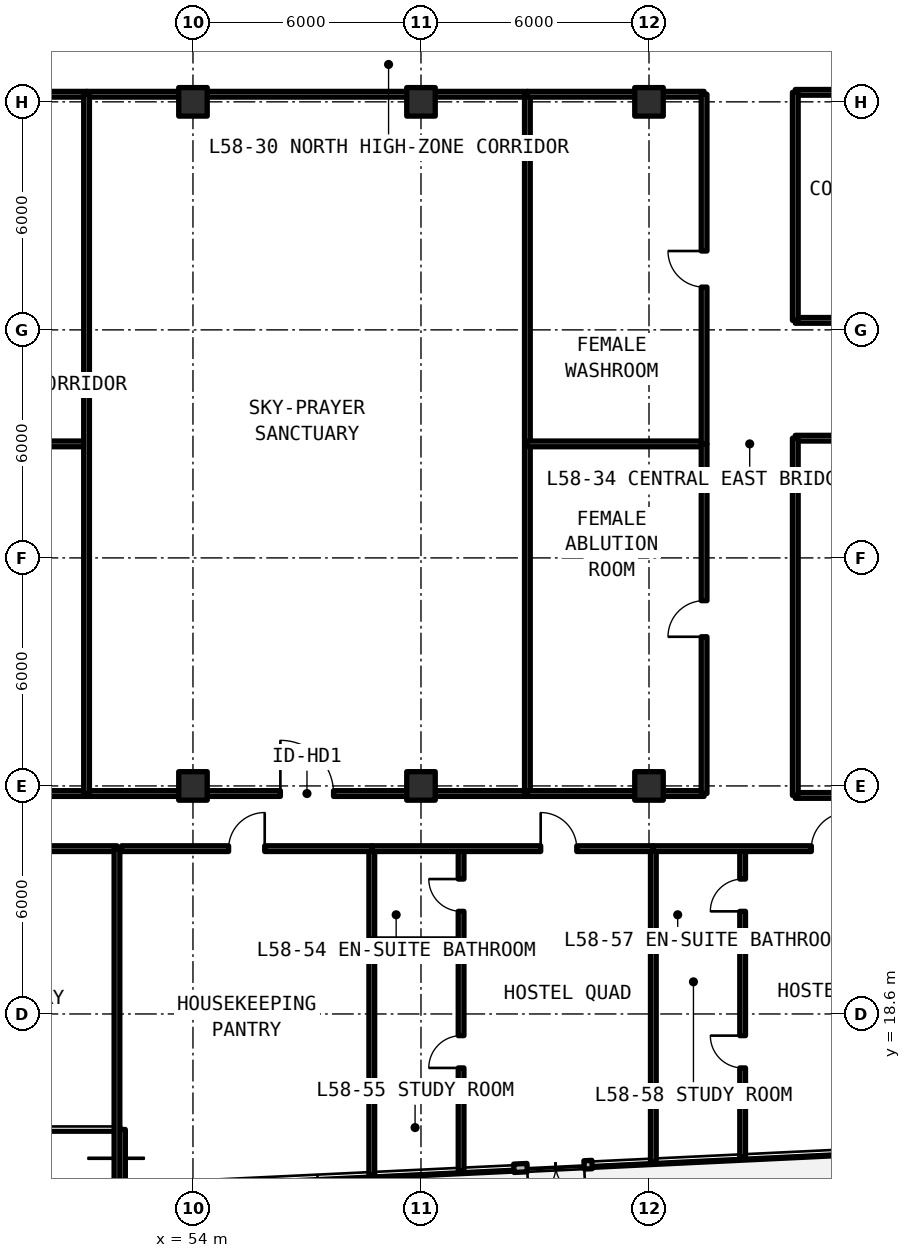
"""IFC4 building model, lengths in metres.
Left out: names, types, materials, properties, quantities, classifications, styles, units other than length and angle.
Written with IfcOpenShell. Run it as: python <this file> out.ifc"""

import sys

from ifc_helpers import new_model, si_unit, direction, frame, frame_2d, origin, origin_2d, place, context, subcontext, project, spatial, rectangle, extrude, element, fill, save


model = new_model("IFC4")
c1 = context("Model", 3, precision=1e-05, world=origin(), true_north=direction((0.0, 1.0)))
c2 = subcontext(c1, "Body", "Model", "MODEL_VIEW")
j1 = project(units=[si_unit("LENGTHUNIT", "METRE"), si_unit("PLANEANGLEUNIT", "RADIAN")], contexts=[c1])
p1 = place(None, origin())
s1 = spatial("IfcSite", under=j1, at=p1, CompositionType="ELEMENT")
p2 = place(p1, origin())
s2 = spatial("IfcBuilding", under=s1, at=p2, CompositionType="ELEMENT")
p3 = place(p2, frame((0.0, 0.0, 208.23)))
s3 = spatial("IfcBuildingStorey", under=s2, at=p3, CompositionType="ELEMENT", Elevation=208.23)
for number, where, z_axis, x_axis in (
    (1, (54.0, 24.6, 0.0), (0.0, 0.0, 1.0), (1.0, 0.0, 0.0)),
    (2, (54.0, 42.6, 0.0), (0.0, 0.0, 1.0), (1.0, 0.0, 0.0)),
    (3, (60.0, 24.6, 0.0), (0.0, 0.0, 1.0), (1.0, 0.0, 0.0)),
    (4, (60.0, 42.6, 0.0), (0.0, 0.0, 1.0), (1.0, 0.0, 0.0)),
    (5, (66.0, 24.6, 0.0), (0.0, 0.0, 1.0), (1.0, 0.0, 0.0)),
    (6, (66.0, 42.6, 0.0), (0.0, 0.0, 1.0), (1.0, 0.0, 0.0)),
):
    element("IfcColumn", number, at=place(p3, frame(where, z_axis=z_axis, x_axis=x_axis)), inside=s3, PredefinedType="COLUMN", context=c2, shape_type="SweptSolid", body=[
        extrude(rectangle(XDim=0.75, YDim=0.75, at=origin_2d()), origin(), (0.0, 0.0, 1.0), 3.63),
    ])
p4 = place(p3, frame((52.11, 15.56, 0.0), z_axis=(0.0, 0.0, 1.0), x_axis=(0.0, -1.0, 0.0)))
e7 = element("IfcWall", 7, at=p4, inside=s3, PredefinedType="SOLIDWALL", context=c2, shape_type="SweptSolid", body=[
    extrude(rectangle(XDim=1.515, YDim=0.22, at=frame_2d((0.757, 0.0))), origin(), (0.0, 0.0, 1.0), 3.41),
])
p5 = place(p3, frame((62.445, 14.54, 0.0), z_axis=(0.0, 0.0, 1.0), x_axis=(0.998858733476, 0.047762229425, 0.0)))
e8 = element("IfcWall", 8, at=p5, inside=s3, PredefinedType="SOLIDWALL", context=c2, shape_type="SweptSolid", body=[
    extrude(rectangle(XDim=2.06, YDim=0.22, at=frame_2d((1.03, 0.0))), origin(), (0.0, 0.0, 1.0), 3.41),
])
p6 = place(p5, frame((0.35, 0.0, 0.0)))
e9 = element("IfcOpeningElement", 9, at=p6, cuts=e8, PredefinedType="OPENING", context=c2, shape_type="SweptSolid", body=[
    extrude(rectangle(XDim=1.5, YDim=2.2, at=frame_2d((0.75, 1.1))), frame((0.0, 0.12, 0.0), z_axis=(0.0, -1.0, 0.0), x_axis=(1.0, 0.0, 0.0)), (0.0, 0.0, 1.0), 0.24),
])
p7 = place(p3, frame((69.85, 24.35, 0.0), z_axis=(0.0, 0.0, 1.0), x_axis=(1.0, 0.0, 0.0)))
e10 = element("IfcWall", 10, at=p7, inside=s3, PredefinedType="SOLIDWALL", context=c2, shape_type="SweptSolid", body=[
    extrude(rectangle(XDim=7.905, YDim=0.15, at=frame_2d((3.952, 0.0))), origin(), (0.0, 0.0, 1.0), 2.63),
])
p8 = place(p3, frame((69.85, 33.75, 0.0), z_axis=(0.0, 0.0, 1.0), x_axis=(1.0, 0.0, 0.0)))
e11 = element("IfcWall", 11, at=p8, inside=s3, PredefinedType="SOLIDWALL", context=c2, shape_type="SweptSolid", body=[
    extrude(rectangle(XDim=7.905, YDim=0.15, at=frame_2d((3.952, 0.0))), origin(), (0.0, 0.0, 1.0), 2.63),
])
p9 = place(p8, frame((3.478, 0.0, 0.0)))
e12 = element("IfcOpeningElement", 12, at=p9, cuts=e11, PredefinedType="OPENING", context=c2, shape_type="SweptSolid", body=[
    extrude(rectangle(XDim=0.95, YDim=2.15, at=frame_2d((0.475, 1.075))), frame((0.0, 0.085, 0.0), z_axis=(0.0, -1.0, 0.0), x_axis=(1.0, 0.0, 0.0)), (0.0, 0.0, 1.0), 0.17),
])
p10 = place(p3, frame((69.85, 24.35, 0.0), z_axis=(0.0, 0.0, 1.0), x_axis=(0.0, 1.0, 0.0)))
e13 = element("IfcWall", 13, at=p10, inside=s3, PredefinedType="SOLIDWALL", context=c2, shape_type="SweptSolid", body=[
    extrude(rectangle(XDim=9.4, YDim=0.15, at=frame_2d((4.7, 0.0))), origin(), (0.0, 0.0, 1.0), 2.63),
])
p11 = place(p3, frame((69.85, 36.85, 0.0), z_axis=(0.0, 0.0, 1.0), x_axis=(1.0, 0.0, 0.0)))
e14 = element("IfcWall", 14, at=p11, inside=s3, PredefinedType="SOLIDWALL", context=c2, shape_type="SweptSolid", body=[
    extrude(rectangle(XDim=7.905, YDim=0.15, at=frame_2d((3.952, 0.0))), origin(), (0.0, 0.0, 1.0), 2.63),
])
p12 = place(p11, frame((3.478, 0.0, 0.0)))
e15 = element("IfcOpeningElement", 15, at=p12, cuts=e14, PredefinedType="OPENING", context=c2, shape_type="SweptSolid", body=[
    extrude(rectangle(XDim=0.95, YDim=2.15, at=frame_2d((0.475, 1.075))), frame((0.0, 0.085, 0.0), z_axis=(0.0, -1.0, 0.0), x_axis=(1.0, 0.0, 0.0)), (0.0, 0.0, 1.0), 0.17),
])
p13 = place(p3, frame((69.85, 42.85, 0.0), z_axis=(0.0, 0.0, 1.0), x_axis=(1.0, 0.0, 0.0)))
e16 = element("IfcWall", 16, at=p13, inside=s3, PredefinedType="SOLIDWALL", context=c2, shape_type="SweptSolid", body=[
    extrude(rectangle(XDim=7.905, YDim=0.15, at=frame_2d((3.952, 0.0))), origin(), (0.0, 0.0, 1.0), 2.63),
])
p14 = place(p3, frame((69.85, 36.85, 0.0), z_axis=(0.0, 0.0, 1.0), x_axis=(0.0, 1.0, 0.0)))
e17 = element("IfcWall", 17, at=p14, inside=s3, PredefinedType="SOLIDWALL", context=c2, shape_type="SweptSolid", body=[
    extrude(rectangle(XDim=6.0, YDim=0.15, at=frame_2d((3.0, 0.0))), origin(), (0.0, 0.0, 1.0), 2.63),
])
for number, where, z_axis, x_axis in (
    (18, (46.55, 24.4, 0.0), (0.0, 0.0, 1.0), (1.0, 0.0, 0.0)),
    (19, (46.55, 33.6, 0.0), (0.0, 0.0, 1.0), (1.0, 0.0, 0.0)),
    (20, (46.55, 42.8, 0.0), (0.0, 0.0, 1.0), (1.0, 0.0, 0.0)),
):
    element("IfcWall", number, at=place(p3, frame(where, z_axis=z_axis, x_axis=x_axis)), inside=s3, PredefinedType="SOLIDWALL", context=c2, shape_type="SweptSolid", body=[
        extrude(rectangle(XDim=4.65, YDim=0.15, at=frame_2d((2.325, 0.0))), origin(), (0.0, 0.0, 1.0), 2.63),
    ])
p15 = place(p3, frame((51.2, 24.4, 0.0), z_axis=(0.0, 0.0, 1.0), x_axis=(1.0, 0.0, 0.0)))
e21 = element("IfcWall", 21, at=p15, inside=s3, PredefinedType="SOLIDWALL", context=c2, shape_type="SweptSolid", body=[
    extrude(rectangle(XDim=11.6, YDim=0.15, at=frame_2d((5.8, 0.0))), origin(), (0.0, 0.0, 1.0), 2.63),
])
p16 = place(p15, frame((5.1, 0.0, 0.0)))
e22 = element("IfcOpeningElement", 22, at=p16, cuts=e21, PredefinedType="OPENING", context=c2, shape_type="SweptSolid", body=[
    extrude(rectangle(XDim=1.4, YDim=2.15, at=frame_2d((0.7, 1.075))), frame((0.0, 0.085, 0.0), z_axis=(0.0, -1.0, 0.0), x_axis=(1.0, 0.0, 0.0)), (0.0, 0.0, 1.0), 0.17),
])
p17 = place(p3, frame((51.2, 42.8, 0.0), z_axis=(0.0, 0.0, 1.0), x_axis=(1.0, 0.0, 0.0)))
e23 = element("IfcWall", 23, at=p17, inside=s3, PredefinedType="SOLIDWALL", context=c2, shape_type="SweptSolid", body=[
    extrude(rectangle(XDim=11.6, YDim=0.15, at=frame_2d((5.8, 0.0))), origin(), (0.0, 0.0, 1.0), 2.63),
])
for number, where, z_axis, x_axis in (
    (24, (51.2, 24.4, 0.0), (0.0, 0.0, 1.0), (0.0, 1.0, 0.0)),
    (25, (62.8, 24.4, 0.0), (0.0, 0.0, 1.0), (0.0, 1.0, 0.0)),
):
    element("IfcWall", number, at=place(p3, frame(where, z_axis=z_axis, x_axis=x_axis)), inside=s3, PredefinedType="SOLIDWALL", context=c2, shape_type="SweptSolid", body=[
        extrude(rectangle(XDim=18.4, YDim=0.15, at=frame_2d((9.2, 0.0))), origin(), (0.0, 0.0, 1.0), 2.63),
    ])
for number, where, z_axis, x_axis in (
    (26, (62.8, 24.4, 0.0), (0.0, 0.0, 1.0), (1.0, 0.0, 0.0)),
    (27, (62.8, 33.6, 0.0), (0.0, 0.0, 1.0), (1.0, 0.0, 0.0)),
):
    element("IfcWall", number, at=place(p3, frame(where, z_axis=z_axis, x_axis=x_axis)), inside=s3, PredefinedType="SOLIDWALL", context=c2, shape_type="SweptSolid", body=[
        extrude(rectangle(XDim=4.65, YDim=0.15, at=frame_2d((2.325, 0.0))), origin(), (0.0, 0.0, 1.0), 2.63),
    ])
p18 = place(p3, frame((67.45, 24.4, 0.0), z_axis=(0.0, 0.0, 1.0), x_axis=(0.0, 1.0, 0.0)))
e28 = element("IfcWall", 28, at=p18, inside=s3, PredefinedType="SOLIDWALL", context=c2, shape_type="SweptSolid", body=[
    extrude(rectangle(XDim=9.2, YDim=0.15, at=frame_2d((4.6, 0.0))), origin(), (0.0, 0.0, 1.0), 2.63),
])
p19 = place(p18, frame((4.125, 0.0, 0.0)))
e29 = element("IfcOpeningElement", 29, at=p19, cuts=e28, PredefinedType="OPENING", context=c2, shape_type="SweptSolid", body=[
    extrude(rectangle(XDim=0.95, YDim=2.15, at=frame_2d((0.475, 1.075))), frame((0.0, 0.085, 0.0), z_axis=(0.0, -1.0, 0.0), x_axis=(1.0, 0.0, 0.0)), (0.0, 0.0, 1.0), 0.17),
])
p20 = place(p3, frame((62.8, 42.8, 0.0), z_axis=(0.0, 0.0, 1.0), x_axis=(1.0, 0.0, 0.0)))
e30 = element("IfcWall", 30, at=p20, inside=s3, PredefinedType="SOLIDWALL", context=c2, shape_type="SweptSolid", body=[
    extrude(rectangle(XDim=4.65, YDim=0.15, at=frame_2d((2.325, 0.0))), origin(), (0.0, 0.0, 1.0), 2.63),
])
p21 = place(p3, frame((67.45, 33.6, 0.0), z_axis=(0.0, 0.0, 1.0), x_axis=(0.0, 1.0, 0.0)))
e31 = element("IfcWall", 31, at=p21, inside=s3, PredefinedType="SOLIDWALL", context=c2, shape_type="SweptSolid", body=[
    extrude(rectangle(XDim=9.2, YDim=0.15, at=frame_2d((4.6, 0.0))), origin(), (0.0, 0.0, 1.0), 2.63),
])
p22 = place(p21, frame((4.125, 0.0, 0.0)))
e32 = element("IfcOpeningElement", 32, at=p22, cuts=e31, PredefinedType="OPENING", context=c2, shape_type="SweptSolid", body=[
    extrude(rectangle(XDim=0.95, YDim=2.15, at=frame_2d((0.475, 1.075))), frame((0.0, 0.085, 0.0), z_axis=(0.0, -1.0, 0.0), x_axis=(1.0, 0.0, 0.0)), (0.0, 0.0, 1.0), 0.17),
])
p23 = place(p3, frame((43.6, 22.95, 0.0), z_axis=(0.0, 0.0, 1.0), x_axis=(1.0, 0.0, 0.0)))
e33 = element("IfcWall", 33, at=p23, inside=s3, PredefinedType="SOLIDWALL", context=c2, shape_type="SweptSolid", body=[
    extrude(rectangle(XDim=8.4, YDim=0.15, at=frame_2d((4.2, 0.0))), origin(), (0.0, 0.0, 1.0), 2.63),
])
p24 = place(p23, frame((2.3, 0.0, 0.0)))
e34 = element("IfcOpeningElement", 34, at=p24, cuts=e33, PredefinedType="OPENING", context=c2, shape_type="SweptSolid", body=[
    extrude(rectangle(XDim=1.1, YDim=2.15, at=frame_2d((0.55, 1.075))), frame((0.0, 0.085, 0.0), z_axis=(0.0, -1.0, 0.0), x_axis=(1.0, 0.0, 0.0)), (0.0, 0.0, 1.0), 0.17),
])
p25 = place(p3, frame((52.0, 14.046, 0.0), z_axis=(0.0, 0.0, 1.0), x_axis=(0.0, 1.0, 0.0)))
e35 = element("IfcWall", 35, at=p25, inside=s3, PredefinedType="SOLIDWALL", context=c2, shape_type="SweptSolid", body=[
    extrude(rectangle(XDim=8.904, YDim=0.15, at=frame_2d((4.452, 0.0))), origin(), (0.0, 0.0, 1.0), 2.63),
])
p26 = place(p3, frame((58.706, 14.361, 0.0), z_axis=(0.0, 0.0, 1.0), x_axis=(0.0, 1.0, 0.0)))
e36 = element("IfcWall", 36, at=p26, inside=s3, PredefinedType="SOLIDWALL", context=c2, shape_type="SweptSolid", body=[
    extrude(rectangle(XDim=8.589, YDim=0.15, at=frame_2d((4.294, 0.0))), origin(), (0.0, 0.0, 1.0), 2.63),
])
p27 = place(p3, frame((52.12, 22.95, 0.0), z_axis=(0.0, 0.0, 1.0), x_axis=(1.0, 0.0, 0.0)))
e37 = element("IfcWall", 37, at=p27, inside=s3, PredefinedType="SOLIDWALL", context=c2, shape_type="SweptSolid", body=[
    extrude(rectangle(XDim=6.585, YDim=0.15, at=frame_2d((3.293, 0.0))), origin(), (0.0, 0.0, 1.0), 2.63),
])
p28 = place(p27, frame((2.818, 0.0, 0.0)))
e38 = element("IfcOpeningElement", 38, at=p28, cuts=e37, PredefinedType="OPENING", context=c2, shape_type="SweptSolid", body=[
    extrude(rectangle(XDim=0.95, YDim=2.15, at=frame_2d((0.475, 1.075))), frame((0.0, 0.085, 0.0), z_axis=(0.0, -1.0, 0.0), x_axis=(1.0, 0.0, 0.0)), (0.0, 0.0, 1.0), 0.17),
])
p29 = place(p3, frame((66.114, 14.716, 0.0), z_axis=(0.0, 0.0, 1.0), x_axis=(0.0, 1.0, 0.0)))
e39 = element("IfcWall", 39, at=p29, inside=s3, PredefinedType="SOLIDWALL", context=c2, shape_type="SweptSolid", body=[
    extrude(rectangle(XDim=8.234, YDim=0.15, at=frame_2d((4.117, 0.0))), origin(), (0.0, 0.0, 1.0), 2.63),
])
p30 = place(p3, frame((58.706, 20.5, 0.0), z_axis=(0.0, 0.0, 1.0), x_axis=(1.0, 0.0, 0.0)))
e40 = element("IfcWall", 40, at=p30, inside=s3, PredefinedType="PARTITIONING", context=c2, shape_type="SweptSolid", body=[
    extrude(rectangle(XDim=2.35, YDim=0.15, at=frame_2d((1.175, 0.0))), origin(), (0.0, 0.0, 1.0), 2.63),
])
p31 = place(p3, frame((61.055, 14.473, 0.0), z_axis=(0.0, 0.0, 1.0), x_axis=(0.0, 1.0, 0.0)))
e41 = element("IfcWall", 41, at=p31, inside=s3, PredefinedType="PARTITIONING", context=c2, shape_type="SweptSolid", body=[
    extrude(rectangle(XDim=8.477, YDim=0.15, at=frame_2d((4.238, 0.0))), origin(), (0.0, 0.0, 1.0), 2.63),
])
p32 = place(p31, frame((2.707, 0.0, 0.0)))
e42 = element("IfcOpeningElement", 42, at=p32, cuts=e41, PredefinedType="OPENING", context=c2, shape_type="SweptSolid", body=[
    extrude(rectangle(XDim=0.85, YDim=2.1, at=frame_2d((0.425, 1.05))), frame((0.0, 0.085, 0.0), z_axis=(0.0, -1.0, 0.0), x_axis=(1.0, 0.0, 0.0)), (0.0, 0.0, 1.0), 0.17),
])
p33 = place(p31, frame((6.827, 0.0, 0.0)))
e43 = element("IfcOpeningElement", 43, at=p33, cuts=e41, PredefinedType="OPENING", context=c2, shape_type="SweptSolid", body=[
    extrude(rectangle(XDim=0.85, YDim=2.1, at=frame_2d((0.425, 1.05))), frame((0.0, 0.085, 0.0), z_axis=(0.0, -1.0, 0.0), x_axis=(1.0, 0.0, 0.0)), (0.0, 0.0, 1.0), 0.17),
])
p34 = place(p3, frame((58.706, 22.95, 0.0), z_axis=(0.0, 0.0, 1.0), x_axis=(1.0, 0.0, 0.0)))
e44 = element("IfcWall", 44, at=p34, inside=s3, PredefinedType="SOLIDWALL", context=c2, shape_type="SweptSolid", body=[
    extrude(rectangle(XDim=7.409, YDim=0.15, at=frame_2d((3.704, 0.0))), origin(), (0.0, 0.0, 1.0), 2.63),
])
p35 = place(p34, frame((4.444, 0.0, 0.0)))
e45 = element("IfcOpeningElement", 45, at=p35, cuts=e44, PredefinedType="OPENING", context=c2, shape_type="SweptSolid", body=[
    extrude(rectangle(XDim=0.95, YDim=2.15, at=frame_2d((0.475, 1.075))), frame((0.0, 0.085, 0.0), z_axis=(0.0, -1.0, 0.0), x_axis=(1.0, 0.0, 0.0)), (0.0, 0.0, 1.0), 0.17),
])
p36 = place(p3, frame((66.114, 20.5, 0.0), z_axis=(0.0, 0.0, 1.0), x_axis=(1.0, 0.0, 0.0)))
e46 = element("IfcWall", 46, at=p36, inside=s3, PredefinedType="PARTITIONING", context=c2, shape_type="SweptSolid", body=[
    extrude(rectangle(XDim=2.35, YDim=0.15, at=frame_2d((1.175, 0.0))), origin(), (0.0, 0.0, 1.0), 2.63),
])
p37 = place(p3, frame((68.464, 14.828, 0.0), z_axis=(0.0, 0.0, 1.0), x_axis=(0.0, 1.0, 0.0)))
e47 = element("IfcWall", 47, at=p37, inside=s3, PredefinedType="PARTITIONING", context=c2, shape_type="SweptSolid", body=[
    extrude(rectangle(XDim=8.122, YDim=0.15, at=frame_2d((4.061, 0.0))), origin(), (0.0, 0.0, 1.0), 2.63),
])
p38 = place(p37, frame((2.352, 0.0, 0.0)))
e48 = element("IfcOpeningElement", 48, at=p38, cuts=e47, PredefinedType="OPENING", context=c2, shape_type="SweptSolid", body=[
    extrude(rectangle(XDim=0.85, YDim=2.1, at=frame_2d((0.425, 1.05))), frame((0.0, 0.085, 0.0), z_axis=(0.0, -1.0, 0.0), x_axis=(1.0, 0.0, 0.0)), (0.0, 0.0, 1.0), 0.17),
])
p39 = place(p37, frame((6.472, 0.0, 0.0)))
e49 = element("IfcOpeningElement", 49, at=p39, cuts=e47, PredefinedType="OPENING", context=c2, shape_type="SweptSolid", body=[
    extrude(rectangle(XDim=0.85, YDim=2.1, at=frame_2d((0.425, 1.05))), frame((0.0, 0.085, 0.0), z_axis=(0.0, -1.0, 0.0), x_axis=(1.0, 0.0, 0.0)), (0.0, 0.0, 1.0), 0.17),
])
p40 = place(p3, frame((66.114, 22.95, 0.0), z_axis=(0.0, 0.0, 1.0), x_axis=(1.0, 0.0, 0.0)))
e50 = element("IfcWall", 50, at=p40, inside=s3, PredefinedType="SOLIDWALL", context=c2, shape_type="SweptSolid", body=[
    extrude(rectangle(XDim=7.134, YDim=0.15, at=frame_2d((3.567, 0.0))), origin(), (0.0, 0.0, 1.0), 2.63),
])
p41 = place(p40, frame((4.157, 0.0, 0.0)))
e51 = element("IfcOpeningElement", 51, at=p41, cuts=e50, PredefinedType="OPENING", context=c2, shape_type="SweptSolid", body=[
    extrude(rectangle(XDim=0.95, YDim=2.15, at=frame_2d((0.475, 1.075))), frame((0.0, 0.085, 0.0), z_axis=(0.0, -1.0, 0.0), x_axis=(1.0, 0.0, 0.0)), (0.0, 0.0, 1.0), 0.17),
])
p42 = place(p6, frame((1.5, 0.0, 0.0), z_axis=(0.0, 0.0, 1.0), x_axis=(-1.0, 0.0, 0.0)))
e52 = element("IfcDoor", 52, at=p42, inside=s3, OperationType="SINGLE_SWING_RIGHT", PredefinedType="DOOR", context=c2, shape_type="SweptSolid", body=[
    extrude(rectangle(XDim=1.5, YDim=2.2, at=frame_2d((0.75, 1.1))), frame((0.0, 0.025, 0.0), z_axis=(0.0, -1.0, 0.0), x_axis=(1.0, 0.0, 0.0)), (0.0, 0.0, 1.0), 0.05),
])
fill(e9, e52)
p43 = place(p16, origin())
e53 = element("IfcDoor", 53, at=p43, inside=s3, OperationType="SINGLE_SWING_RIGHT", PredefinedType="DOOR", context=c2, shape_type="SweptSolid", body=[
    extrude(rectangle(XDim=1.4, YDim=2.15, at=frame_2d((0.7, 1.075))), frame((0.0, 0.025, 0.0), z_axis=(0.0, -1.0, 0.0), x_axis=(1.0, 0.0, 0.0)), (0.0, 0.0, 1.0), 0.05),
])
fill(e22, e53)
p44 = place(p19, origin())
e54 = element("IfcDoor", 54, at=p44, inside=s3, OperationType="SINGLE_SWING_LEFT", PredefinedType="DOOR", context=c2, shape_type="SweptSolid", body=[
    extrude(rectangle(XDim=0.95, YDim=2.15, at=frame_2d((0.475, 1.075))), frame((0.0, 0.025, 0.0), z_axis=(0.0, -1.0, 0.0), x_axis=(1.0, 0.0, 0.0)), (0.0, 0.0, 1.0), 0.05),
])
fill(e29, e54)
p45 = place(p22, origin())
e55 = element("IfcDoor", 55, at=p45, inside=s3, OperationType="SINGLE_SWING_RIGHT", PredefinedType="DOOR", context=c2, shape_type="SweptSolid", body=[
    extrude(rectangle(XDim=0.95, YDim=2.15, at=frame_2d((0.475, 1.075))), frame((0.0, 0.025, 0.0), z_axis=(0.0, -1.0, 0.0), x_axis=(1.0, 0.0, 0.0)), (0.0, 0.0, 1.0), 0.05),
])
fill(e32, e55)
p46 = place(p28, origin())
e56 = element("IfcDoor", 56, at=p46, inside=s3, OperationType="SINGLE_SWING_RIGHT", PredefinedType="DOOR", context=c2, shape_type="SweptSolid", body=[
    extrude(rectangle(XDim=0.95, YDim=2.15, at=frame_2d((0.475, 1.075))), frame((0.0, 0.025, 0.0), z_axis=(0.0, -1.0, 0.0), x_axis=(1.0, 0.0, 0.0)), (0.0, 0.0, 1.0), 0.05),
])
fill(e38, e56)
p47 = place(p32, origin())
e57 = element("IfcDoor", 57, at=p47, inside=s3, OperationType="SINGLE_SWING_LEFT", PredefinedType="DOOR", context=c2, shape_type="SweptSolid", body=[
    extrude(rectangle(XDim=0.85, YDim=2.1, at=frame_2d((0.425, 1.05))), frame((0.0, 0.025, 0.0), z_axis=(0.0, -1.0, 0.0), x_axis=(1.0, 0.0, 0.0)), (0.0, 0.0, 1.0), 0.05),
])
fill(e42, e57)
p48 = place(p33, origin())
e58 = element("IfcDoor", 58, at=p48, inside=s3, OperationType="SINGLE_SWING_RIGHT", PredefinedType="DOOR", context=c2, shape_type="SweptSolid", body=[
    extrude(rectangle(XDim=0.85, YDim=2.1, at=frame_2d((0.425, 1.05))), frame((0.0, 0.025, 0.0), z_axis=(0.0, -1.0, 0.0), x_axis=(1.0, 0.0, 0.0)), (0.0, 0.0, 1.0), 0.05),
])
fill(e43, e58)
p49 = place(p35, origin())
e59 = element("IfcDoor", 59, at=p49, inside=s3, OperationType="SINGLE_SWING_LEFT", PredefinedType="DOOR", context=c2, shape_type="SweptSolid", body=[
    extrude(rectangle(XDim=0.95, YDim=2.15, at=frame_2d((0.475, 1.075))), frame((0.0, 0.025, 0.0), z_axis=(0.0, -1.0, 0.0), x_axis=(1.0, 0.0, 0.0)), (0.0, 0.0, 1.0), 0.05),
])
fill(e45, e59)
p50 = place(p38, origin())
e60 = element("IfcDoor", 60, at=p50, inside=s3, OperationType="SINGLE_SWING_RIGHT", PredefinedType="DOOR", context=c2, shape_type="SweptSolid", body=[
    extrude(rectangle(XDim=0.85, YDim=2.1, at=frame_2d((0.425, 1.05))), frame((0.0, 0.025, 0.0), z_axis=(0.0, -1.0, 0.0), x_axis=(1.0, 0.0, 0.0)), (0.0, 0.0, 1.0), 0.05),
])
fill(e48, e60)
p51 = place(p39, origin())
e61 = element("IfcDoor", 61, at=p51, inside=s3, OperationType="SINGLE_SWING_LEFT", PredefinedType="DOOR", context=c2, shape_type="SweptSolid", body=[
    extrude(rectangle(XDim=0.85, YDim=2.1, at=frame_2d((0.425, 1.05))), frame((0.0, 0.025, 0.0), z_axis=(0.0, -1.0, 0.0), x_axis=(1.0, 0.0, 0.0)), (0.0, 0.0, 1.0), 0.05),
])
fill(e49, e61)
p52 = place(p41, origin())
e62 = element("IfcDoor", 62, at=p52, inside=s3, OperationType="SINGLE_SWING_RIGHT", PredefinedType="DOOR", context=c2, shape_type="SweptSolid", body=[
    extrude(rectangle(XDim=0.95, YDim=2.15, at=frame_2d((0.475, 1.075))), frame((0.0, 0.025, 0.0), z_axis=(0.0, -1.0, 0.0), x_axis=(1.0, 0.0, 0.0)), (0.0, 0.0, 1.0), 0.05),
])
fill(e51, e62)
save(model, sys.argv[1])
